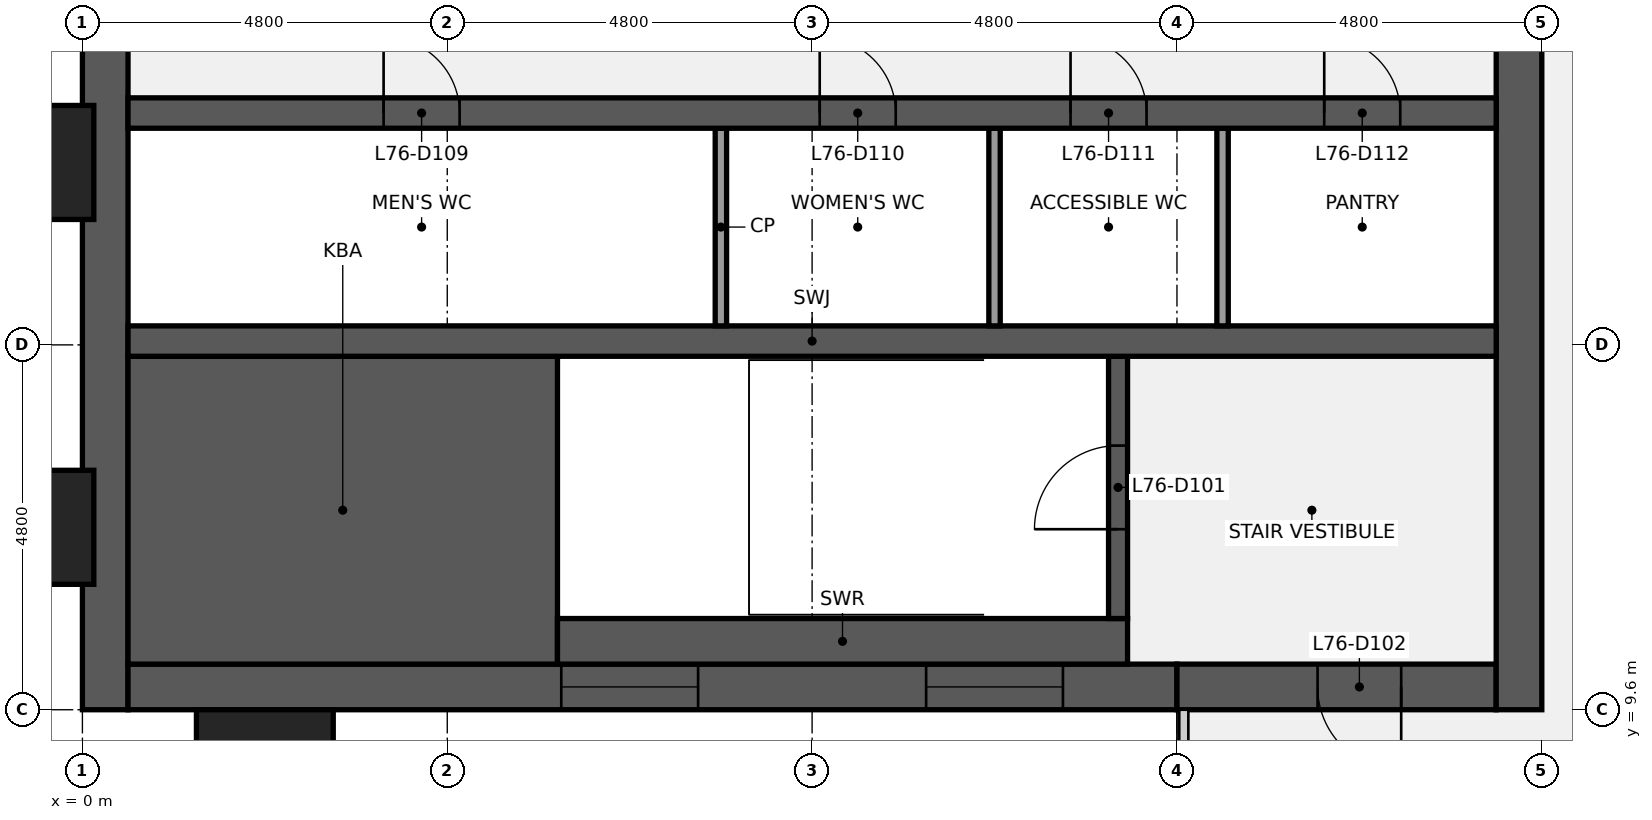
"""IFC4 building model, lengths in metres.
Left out: names, types, materials, properties, quantities, classifications, styles, units other than length and angle.
Written with IfcOpenShell. Run it as: python <this file> out.ifc"""

import sys

from ifc_helpers import new_model, si_unit, direction, frame, frame_2d, origin, origin_2d, place, context, subcontext, project, spatial, rectangle, extrude, element, fill, save


model = new_model("IFC4")
c1 = context("Model", 3, precision=1e-05, world=origin(), true_north=direction((0.0, 1.0)))
c2 = subcontext(c1, "Body", "Model", "MODEL_VIEW")
j1 = project(units=[si_unit("LENGTHUNIT", "METRE"), si_unit("PLANEANGLEUNIT", "RADIAN")], contexts=[c1])
p1 = place(None, origin())
s1 = spatial("IfcSite", under=j1, at=p1, CompositionType="ELEMENT")
p2 = place(p1, origin())
s2 = spatial("IfcBuilding", under=s1, at=p2, CompositionType="ELEMENT")
p3 = place(p2, frame((0.0, 0.0, 342.3)))
s3 = spatial("IfcBuildingStorey", under=s2, at=p3, CompositionType="ELEMENT", Elevation=342.3)
p4 = place(p3, frame((0.3, 9.6, 0.0), z_axis=(0.0, 0.0, 1.0), x_axis=(0.0, 1.0, 0.0)))
e1 = element("IfcWall", 1, at=p4, inside=s3, PredefinedType="SHEAR", context=c2, shape_type="SweptSolid", body=[
    extrude(rectangle(XDim=28.8, YDim=0.6, at=frame_2d((14.4, 0.0))), origin(), (0.0, 0.0, 1.0), 3.84),
])
p5 = place(p4, frame((8.85, 0.0, 0.9)))
e2 = element("IfcOpeningElement", 2, at=p5, cuts=e1, PredefinedType="OPENING", context=c2, shape_type="SweptSolid", body=[
    extrude(rectangle(XDim=1.5, YDim=1.5, at=frame_2d((0.75, 0.75))), frame((0.0, 0.31, 0.0), z_axis=(0.0, -1.0, 0.0), x_axis=(1.0, 0.0, 0.0)), (0.0, 0.0, 1.0), 0.62),
])
p6 = place(p4, frame((18.45, 0.0, 0.9)))
e3 = element("IfcOpeningElement", 3, at=p6, cuts=e1, PredefinedType="OPENING", context=c2, shape_type="SweptSolid", body=[
    extrude(rectangle(XDim=1.5, YDim=1.5, at=frame_2d((0.75, 0.75))), frame((0.0, 0.31, 0.0), z_axis=(0.0, -1.0, 0.0), x_axis=(1.0, 0.0, 0.0)), (0.0, 0.0, 1.0), 0.62),
])
p7 = place(p3, frame((14.4, 9.9, 0.0), z_axis=(0.0, 0.0, 1.0), x_axis=(-1.0, 0.0, 0.0)))
e4 = element("IfcWall", 4, at=p7, inside=s3, PredefinedType="SHEAR", context=c2, shape_type="SweptSolid", body=[
    extrude(rectangle(XDim=13.8, YDim=0.6, at=frame_2d((6.9, 0.0))), origin(), (0.0, 0.0, 1.0), 3.84),
])
p8 = place(p7, frame((6.3, 0.0, 0.9)))
e5 = element("IfcOpeningElement", 5, at=p8, cuts=e4, PredefinedType="OPENING", context=c2, shape_type="SweptSolid", body=[
    extrude(rectangle(XDim=1.8, YDim=1.5, at=frame_2d((0.9, 0.75))), frame((0.0, 0.31, 0.0), z_axis=(0.0, -1.0, 0.0), x_axis=(1.0, 0.0, 0.0)), (0.0, 0.0, 1.0), 0.62),
])
p9 = place(p7, frame((1.5, 0.0, 0.9)))
e6 = element("IfcOpeningElement", 6, at=p9, cuts=e4, PredefinedType="OPENING", context=c2, shape_type="SweptSolid", body=[
    extrude(rectangle(XDim=1.8, YDim=1.5, at=frame_2d((0.9, 0.75))), frame((0.0, 0.31, 0.0), z_axis=(0.0, -1.0, 0.0), x_axis=(1.0, 0.0, 0.0)), (0.0, 0.0, 1.0), 0.62),
])
p10 = place(p3, frame((18.6, 9.9, 0.0), z_axis=(0.0, 0.0, 1.0), x_axis=(-1.0, 0.0, 0.0)))
e7 = element("IfcWall", 7, at=p10, inside=s3, PredefinedType="SHEAR", context=c2, shape_type="SweptSolid", body=[
    extrude(rectangle(XDim=4.2, YDim=0.6, at=frame_2d((2.1, 0.0))), origin(), (0.0, 0.0, 1.0), 3.84),
])
p11 = place(p10, frame((1.25, 0.0, 0.0)))
e8 = element("IfcOpeningElement", 8, at=p11, cuts=e7, PredefinedType="OPENING", context=c2, shape_type="SweptSolid", body=[
    extrude(rectangle(XDim=1.1, YDim=2.1, at=frame_2d((0.55, 1.05))), frame((0.0, 0.31, 0.0), z_axis=(0.0, -1.0, 0.0), x_axis=(1.0, 0.0, 0.0)), (0.0, 0.0, 1.0), 0.62),
])
p12 = place(p3, frame((18.9, 38.4, 0.0), z_axis=(0.0, 0.0, 1.0), x_axis=(0.0, -1.0, 0.0)))
e9 = element("IfcWall", 9, at=p12, inside=s3, PredefinedType="SHEAR", context=c2, shape_type="SweptSolid", body=[
    extrude(rectangle(XDim=28.8, YDim=0.6, at=frame_2d((14.4, 0.0))), origin(), (0.0, 0.0, 1.0), 3.84),
])
p13 = place(p12, frame((18.3, 0.0, 0.0)))
e10 = element("IfcOpeningElement", 10, at=p13, cuts=e9, PredefinedType="OPENING", context=c2, shape_type="SweptSolid", body=[
    extrude(rectangle(XDim=1.8, YDim=2.1, at=frame_2d((0.9, 1.05))), frame((0.0, 0.31, 0.0), z_axis=(0.0, -1.0, 0.0), x_axis=(1.0, 0.0, 0.0)), (0.0, 0.0, 1.0), 0.62),
])
p14 = place(p12, frame((8.7, 0.0, 0.0)))
e11 = element("IfcOpeningElement", 11, at=p14, cuts=e9, PredefinedType="OPENING", context=c2, shape_type="SweptSolid", body=[
    extrude(rectangle(XDim=1.8, YDim=2.1, at=frame_2d((0.9, 1.05))), frame((0.0, 0.31, 0.0), z_axis=(0.0, -1.0, 0.0), x_axis=(1.0, 0.0, 0.0)), (0.0, 0.0, 1.0), 0.62),
])
p15 = place(p3, frame((0.6, 12.225, 0.0), z_axis=(0.0, 0.0, 1.0), x_axis=(1.0, 0.0, 0.0)))
e12 = element("IfcWall", 12, at=p15, inside=s3, PredefinedType="SHEAR", context=c2, shape_type="SweptSolid", body=[
    extrude(rectangle(XDim=5.65, YDim=4.05, at=frame_2d((2.825, 0.0))), origin(), (0.0, 0.0, 1.0), 3.84),
])
p16 = place(p3, frame((6.25, 10.5, 0.0), z_axis=(0.0, 0.0, 1.0), x_axis=(1.0, 0.0, 0.0)))
e13 = element("IfcWall", 13, at=p16, inside=s3, PredefinedType="SHEAR", context=c2, shape_type="SweptSolid", body=[
    extrude(rectangle(XDim=7.5, YDim=0.6, at=frame_2d((3.75, 0.0))), origin(), (0.0, 0.0, 1.0), 3.84),
])
p17 = place(p3, frame((13.625, 10.8, 0.0), z_axis=(0.0, 0.0, 1.0), x_axis=(0.0, 1.0, 0.0)))
e14 = element("IfcWall", 14, at=p17, inside=s3, PredefinedType="SHEAR", context=c2, shape_type="SweptSolid", body=[
    extrude(rectangle(XDim=3.45, YDim=0.25, at=frame_2d((1.725, 0.0))), origin(), (0.0, 0.0, 1.0), 3.84),
])
p18 = place(p17, frame((1.175, 0.0, 0.0)))
e15 = element("IfcOpeningElement", 15, at=p18, cuts=e14, PredefinedType="OPENING", context=c2, shape_type="SweptSolid", body=[
    extrude(rectangle(XDim=1.1, YDim=2.1, at=frame_2d((0.55, 1.05))), frame((0.0, 0.135, 0.0), z_axis=(0.0, -1.0, 0.0), x_axis=(1.0, 0.0, 0.0)), (0.0, 0.0, 1.0), 0.27),
])
p19 = place(p3, frame((0.6, 14.45, 0.0), z_axis=(0.0, 0.0, 1.0), x_axis=(1.0, 0.0, 0.0)))
e16 = element("IfcWall", 16, at=p19, inside=s3, PredefinedType="SHEAR", context=c2, shape_type="SweptSolid", body=[
    extrude(rectangle(XDim=18.0, YDim=0.4, at=frame_2d((9.0, 0.0))), origin(), (0.0, 0.0, 1.0), 3.84),
])
for number, where, z_axis, x_axis in (
    (17, (8.4, 14.65, 0.0), (0.0, 0.0, 1.0), (0.0, 1.0, 0.0)),
    (18, (12.0, 14.65, 0.0), (0.0, 0.0, 1.0), (0.0, 1.0, 0.0)),
    (19, (15.0, 14.65, 0.0), (0.0, 0.0, 1.0), (0.0, 1.0, 0.0)),
):
    element("IfcWall", number, at=place(p3, frame(where, z_axis=z_axis, x_axis=x_axis)), inside=s3, PredefinedType="PARTITIONING", context=c2, shape_type="SweptSolid", body=[
        extrude(rectangle(XDim=2.6, YDim=0.15, at=frame_2d((1.3, 0.0))), origin(), (0.0, 0.0, 1.0), 3.84),
    ])
p20 = place(p3, frame((0.6, 17.45, 0.0), z_axis=(0.0, 0.0, 1.0), x_axis=(1.0, 0.0, 0.0)))
e20 = element("IfcWall", 20, at=p20, inside=s3, PredefinedType="SHEAR", context=c2, shape_type="SweptSolid", body=[
    extrude(rectangle(XDim=18.0, YDim=0.4, at=frame_2d((9.0, 0.0))), origin(), (0.0, 0.0, 1.0), 3.84),
])
p21 = place(p20, frame((3.363, 0.0, 0.0)))
e21 = element("IfcOpeningElement", 21, at=p21, cuts=e20, PredefinedType="OPENING", context=c2, shape_type="SweptSolid", body=[
    extrude(rectangle(XDim=1.0, YDim=2.1, at=frame_2d((0.5, 1.05))), frame((0.0, 0.21, 0.0), z_axis=(0.0, -1.0, 0.0), x_axis=(1.0, 0.0, 0.0)), (0.0, 0.0, 1.0), 0.42),
])
p22 = place(p20, frame((9.1, 0.0, 0.0)))
e22 = element("IfcOpeningElement", 22, at=p22, cuts=e20, PredefinedType="OPENING", context=c2, shape_type="SweptSolid", body=[
    extrude(rectangle(XDim=1.0, YDim=2.1, at=frame_2d((0.5, 1.05))), frame((0.0, 0.21, 0.0), z_axis=(0.0, -1.0, 0.0), x_axis=(1.0, 0.0, 0.0)), (0.0, 0.0, 1.0), 0.42),
])
p23 = place(p20, frame((12.4, 0.0, 0.0)))
e23 = element("IfcOpeningElement", 23, at=p23, cuts=e20, PredefinedType="OPENING", context=c2, shape_type="SweptSolid", body=[
    extrude(rectangle(XDim=1.0, YDim=2.1, at=frame_2d((0.5, 1.05))), frame((0.0, 0.21, 0.0), z_axis=(0.0, -1.0, 0.0), x_axis=(1.0, 0.0, 0.0)), (0.0, 0.0, 1.0), 0.42),
])
p24 = place(p20, frame((15.738, 0.0, 0.0)))
e24 = element("IfcOpeningElement", 24, at=p24, cuts=e20, PredefinedType="OPENING", context=c2, shape_type="SweptSolid", body=[
    extrude(rectangle(XDim=1.0, YDim=2.1, at=frame_2d((0.5, 1.05))), frame((0.0, 0.21, 0.0), z_axis=(0.0, -1.0, 0.0), x_axis=(1.0, 0.0, 0.0)), (0.0, 0.0, 1.0), 0.42),
])
for number, where, z_axis, x_axis in (
    (25, (-0.75, 12.0, 0.0), (0.0, 0.0, 1.0), (0.0, 1.0, 0.0)),
    (26, (-0.75, 16.8, 0.0), (0.0, 0.0, 1.0), (0.0, 1.0, 0.0)),
    (27, (2.4, 8.85, 0.0), (0.0, 0.0, 1.0), (1.0, 0.0, 0.0)),
):
    element("IfcColumn", number, at=place(p3, frame(where, z_axis=z_axis, x_axis=x_axis)), inside=s3, PredefinedType="PILASTER", context=c2, shape_type="SweptSolid", body=[
        extrude(rectangle(XDim=1.8, YDim=1.5, at=origin_2d()), origin(), (0.0, 0.0, 1.0), 4.0),
    ])
p25 = place(p18, origin())
e28 = element("IfcDoor", 28, at=p25, inside=s3, OperationType="SINGLE_SWING_LEFT", PredefinedType="DOOR", context=c2, shape_type="SweptSolid", body=[
    extrude(rectangle(XDim=1.1, YDim=2.1, at=frame_2d((0.55, 1.05))), frame((0.0, 0.025, 0.0), z_axis=(0.0, -1.0, 0.0), x_axis=(1.0, 0.0, 0.0)), (0.0, 0.0, 1.0), 0.05),
])
fill(e15, e28)
p26 = place(p11, origin())
e29 = element("IfcDoor", 29, at=p26, inside=s3, OperationType="SINGLE_SWING_LEFT", PredefinedType="DOOR", context=c2, shape_type="SweptSolid", body=[
    extrude(rectangle(XDim=1.1, YDim=2.1, at=frame_2d((0.55, 1.05))), frame((0.0, 0.025, 0.0), z_axis=(0.0, -1.0, 0.0), x_axis=(1.0, 0.0, 0.0)), (0.0, 0.0, 1.0), 0.05),
])
fill(e8, e29)
p27 = place(p21, origin())
e30 = element("IfcDoor", 30, at=p27, inside=s3, OperationType="SINGLE_SWING_LEFT", PredefinedType="DOOR", context=c2, shape_type="SweptSolid", body=[
    extrude(rectangle(XDim=1.0, YDim=2.1, at=frame_2d((0.5, 1.05))), frame((0.0, 0.025, 0.0), z_axis=(0.0, -1.0, 0.0), x_axis=(1.0, 0.0, 0.0)), (0.0, 0.0, 1.0), 0.05),
])
fill(e21, e30)
p28 = place(p22, origin())
e31 = element("IfcDoor", 31, at=p28, inside=s3, OperationType="SINGLE_SWING_LEFT", PredefinedType="DOOR", context=c2, shape_type="SweptSolid", body=[
    extrude(rectangle(XDim=1.0, YDim=2.1, at=frame_2d((0.5, 1.05))), frame((0.0, 0.025, 0.0), z_axis=(0.0, -1.0, 0.0), x_axis=(1.0, 0.0, 0.0)), (0.0, 0.0, 1.0), 0.05),
])
fill(e22, e31)
p29 = place(p23, origin())
e32 = element("IfcDoor", 32, at=p29, inside=s3, OperationType="SINGLE_SWING_LEFT", PredefinedType="DOOR", context=c2, shape_type="SweptSolid", body=[
    extrude(rectangle(XDim=1.0, YDim=2.1, at=frame_2d((0.5, 1.05))), frame((0.0, 0.025, 0.0), z_axis=(0.0, -1.0, 0.0), x_axis=(1.0, 0.0, 0.0)), (0.0, 0.0, 1.0), 0.05),
])
fill(e23, e32)
p30 = place(p24, origin())
e33 = element("IfcDoor", 33, at=p30, inside=s3, OperationType="SINGLE_SWING_LEFT", PredefinedType="DOOR", context=c2, shape_type="SweptSolid", body=[
    extrude(rectangle(XDim=1.0, YDim=2.1, at=frame_2d((0.5, 1.05))), frame((0.0, 0.025, 0.0), z_axis=(0.0, -1.0, 0.0), x_axis=(1.0, 0.0, 0.0)), (0.0, 0.0, 1.0), 0.05),
])
fill(e24, e33)
p31 = place(p8, origin())
e34 = element("IfcWindow", 34, at=p31, inside=s3, PartitioningType="SINGLE_PANEL", PredefinedType="WINDOW", context=c2, shape_type="SweptSolid", body=[
    extrude(rectangle(XDim=1.8, YDim=1.5, at=frame_2d((0.9, 0.75))), frame((0.0, 0.03, 0.0), z_axis=(0.0, -1.0, 0.0), x_axis=(1.0, 0.0, 0.0)), (0.0, 0.0, 1.0), 0.06),
])
fill(e5, e34)
p32 = place(p9, origin())
e35 = element("IfcWindow", 35, at=p32, inside=s3, PartitioningType="SINGLE_PANEL", PredefinedType="WINDOW", context=c2, shape_type="SweptSolid", body=[
    extrude(rectangle(XDim=1.8, YDim=1.5, at=frame_2d((0.9, 0.75))), frame((0.0, 0.03, 0.0), z_axis=(0.0, -1.0, 0.0), x_axis=(1.0, 0.0, 0.0)), (0.0, 0.0, 1.0), 0.06),
])
fill(e6, e35)
save(model, sys.argv[1])
